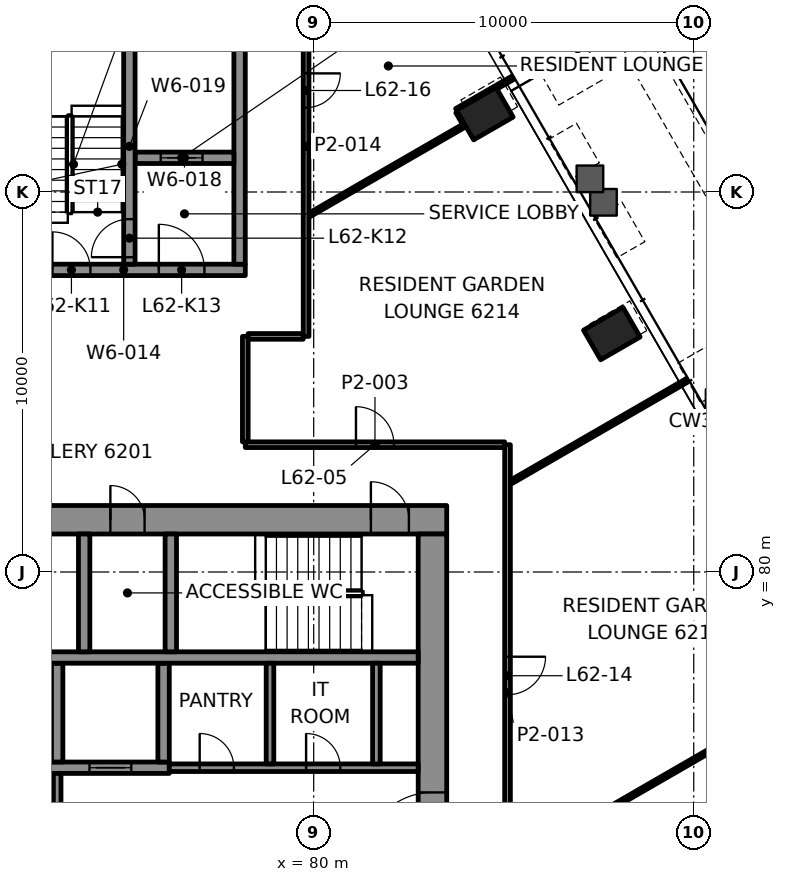
"""IFC4 building model, lengths in metres.
Left out: names, types, materials, properties, quantities, classifications, styles, units other than length and angle.
Written with IfcOpenShell. Run it as: python <this file> out.ifc"""

import sys

from ifc_helpers import new_model, si_unit, direction, frame, frame_2d, origin, origin_2d, place, context, subcontext, project, spatial, rectangle, hollow_rectangle, extrude, element, fill, save


model = new_model("IFC4")
c1 = context("Model", 3, precision=1e-05, world=origin(), true_north=direction((0.0, 1.0)))
c2 = subcontext(c1, "Body", "Model", "MODEL_VIEW")
j1 = project(units=[si_unit("LENGTHUNIT", "METRE"), si_unit("PLANEANGLEUNIT", "RADIAN")], contexts=[c1])
p1 = place(None, origin())
s1 = spatial("IfcSite", under=j1, at=p1, CompositionType="ELEMENT")
p2 = place(p1, origin())
s2 = spatial("IfcBuilding", under=s1, at=p2, CompositionType="ELEMENT")
p3 = place(p2, frame((0.0, 0.0, 263.6)))
s3 = spatial("IfcBuildingStorey", under=s2, at=p3, CompositionType="ELEMENT", Elevation=263.6)
for number, where, z_axis, x_axis in (
    (1, (87.844, 86.274, -0.0), (0.0, 0.0, 1.0), (-0.5, 0.866, 0.0)),
    (2, (84.503, 92.062, -0.0), (0.0, 0.0, 1.0), (-0.5, 0.866, 0.0)),
):
    element("IfcColumn", number, at=place(p3, frame(where, z_axis=z_axis, x_axis=x_axis)), inside=s3, PredefinedType="COLUMN", context=c2, shape_type="SweptSolid", body=[
        extrude(hollow_rectangle(XDim=0.9, YDim=1.2, WallThickness=0.06, at=origin_2d()), origin(), (0.0, 0.0, 1.0), 3.5),
    ])
p4 = place(p3, frame((66.5, 81.375, 0.0), z_axis=(0.0, 0.0, 1.0), x_axis=(1.0, 0.0, 0.0)))
e3 = element("IfcWall", 3, at=p4, inside=s3, PredefinedType="SHEAR", context=c2, shape_type="SweptSolid", body=[
    extrude(rectangle(XDim=17.0, YDim=0.75, at=frame_2d((8.5, 0.0))), origin(), (0.0, 0.0, 1.0), 3.3),
])
p5 = place(p4, frame((1.195, 0.0, 0.0)))
e4 = element("IfcOpeningElement", 4, at=p5, cuts=e3, PredefinedType="OPENING", context=c2, shape_type="SweptSolid", body=[
    extrude(rectangle(XDim=1.0, YDim=2.1, at=frame_2d((0.5, 1.05))), frame((0.0, 0.385, 0.0), z_axis=(0.0, -1.0, 0.0), x_axis=(1.0, 0.0, 0.0)), (0.0, 0.0, 1.0), 0.77),
])
p6 = place(p4, frame((15.005, 0.0, 0.0)))
e5 = element("IfcOpeningElement", 5, at=p6, cuts=e3, PredefinedType="OPENING", context=c2, shape_type="SweptSolid", body=[
    extrude(rectangle(XDim=1.0, YDim=2.1, at=frame_2d((0.5, 1.05))), frame((0.0, 0.385, 0.0), z_axis=(0.0, -1.0, 0.0), x_axis=(1.0, 0.0, 0.0)), (0.0, 0.0, 1.0), 0.77),
])
p7 = place(p4, frame((8.15, 0.0, 0.0)))
e6 = element("IfcOpeningElement", 6, at=p7, cuts=e3, PredefinedType="OPENING", context=c2, shape_type="SweptSolid", body=[
    extrude(rectangle(XDim=0.9, YDim=2.1, at=frame_2d((0.45, 1.05))), frame((0.0, 0.385, 0.0), z_axis=(0.0, -1.0, 0.0), x_axis=(1.0, 0.0, 0.0)), (0.0, 0.0, 1.0), 0.77),
])
p8 = place(p3, frame((83.125, 69.0, 0.0), z_axis=(0.0, 0.0, 1.0), x_axis=(0.0, 1.0, 0.0)))
e7 = element("IfcWall", 7, at=p8, inside=s3, PredefinedType="SHEAR", context=c2, shape_type="SweptSolid", body=[
    extrude(rectangle(XDim=12.0, YDim=0.75, at=frame_2d((6.0, 0.0))), origin(), (0.0, 0.0, 1.0), 3.3),
])
p9 = place(p8, frame((3.4, 0.0, 0.0)))
e8 = element("IfcOpeningElement", 8, at=p9, cuts=e7, PredefinedType="OPENING", context=c2, shape_type="SweptSolid", body=[
    extrude(rectangle(XDim=1.8, YDim=2.1, at=frame_2d((0.9, 1.05))), frame((0.0, 0.385, 0.0), z_axis=(0.0, -1.0, 0.0), x_axis=(1.0, 0.0, 0.0)), (0.0, 0.0, 1.0), 0.77),
])
p10 = place(p3, frame((70.3, 74.85, 0.0), z_axis=(0.0, 0.0, 1.0), x_axis=(1.0, 0.0, 0.0)))
e9 = element("IfcWall", 9, at=p10, inside=s3, PredefinedType="SHEAR", context=c2, shape_type="SweptSolid", body=[
    extrude(rectangle(XDim=5.9, YDim=0.3, at=frame_2d((2.95, 0.0))), origin(), (0.0, 0.0, 1.0), 3.3),
])
p11 = place(p10, frame((3.8, 0.0, 0.0)))
e10 = element("IfcOpeningElement", 10, at=p11, cuts=e9, PredefinedType="OPENING", context=c2, shape_type="SweptSolid", body=[
    extrude(rectangle(XDim=1.1, YDim=2.1, at=frame_2d((0.55, 1.05))), frame((0.0, 0.16, 0.0), z_axis=(0.0, -1.0, 0.0), x_axis=(1.0, 0.0, 0.0)), (0.0, 0.0, 1.0), 0.32),
])
for number, where, z_axis, x_axis in (
    (11, (73.25, 75.0, 0.0), (0.0, 0.0, 1.0), (0.0, 1.0, 0.0)),
    (12, (76.05, 75.0, 0.0), (0.0, 0.0, 1.0), (0.0, 1.0, 0.0)),
):
    element("IfcWall", number, at=place(p3, frame(where, z_axis=z_axis, x_axis=x_axis)), inside=s3, PredefinedType="SHEAR", context=c2, shape_type="SweptSolid", body=[
        extrude(rectangle(XDim=2.6, YDim=0.3, at=frame_2d((1.3, 0.0))), origin(), (0.0, 0.0, 1.0), 3.3),
    ])
p12 = place(p3, frame((67.25, 77.75, 0.0), z_axis=(0.0, 0.0, 1.0), x_axis=(1.0, 0.0, 0.0)))
e13 = element("IfcWall", 13, at=p12, inside=s3, PredefinedType="SHEAR", context=c2, shape_type="SweptSolid", body=[
    extrude(rectangle(XDim=15.5, YDim=0.3, at=frame_2d((7.75, 0.0))), origin(), (0.0, 0.0, 1.0), 3.3),
])
p13 = place(p12, frame((0.445, 0.0, 0.0)))
e14 = element("IfcOpeningElement", 14, at=p13, cuts=e13, PredefinedType="OPENING", context=c2, shape_type="SweptSolid", body=[
    extrude(rectangle(XDim=1.0, YDim=2.1, at=frame_2d((0.5, 1.05))), frame((0.0, 0.16, 0.0), z_axis=(0.0, -1.0, 0.0), x_axis=(1.0, 0.0, 0.0)), (0.0, 0.0, 1.0), 0.32),
])
for number, where, z_axis, x_axis in (
    (15, (73.96, 77.9, 0.0), (0.0, 0.0, 1.0), (0.0, 1.0, 0.0)),
    (16, (76.24, 77.9, 0.0), (0.0, 0.0, 1.0), (0.0, 1.0, 0.0)),
):
    element("IfcWall", number, at=place(p3, frame(where, z_axis=z_axis, x_axis=x_axis)), inside=s3, PredefinedType="SHEAR", context=c2, shape_type="SweptSolid", body=[
        extrude(rectangle(XDim=3.1, YDim=0.3, at=frame_2d((1.55, 0.0))), origin(), (0.0, 0.0, 1.0), 3.3),
    ])
p14 = place(p3, frame((71.8, 87.95, 0.0), z_axis=(0.0, 0.0, 1.0), x_axis=(1.0, 0.0, 0.0)))
e17 = element("IfcWall", 17, at=p14, inside=s3, PredefinedType="SHEAR", context=c2, shape_type="SweptSolid", body=[
    extrude(rectangle(XDim=6.4, YDim=0.3, at=frame_2d((3.2, 0.0))), origin(), (0.0, 0.0, 1.0), 3.3),
])
p15 = place(p14, frame((1.325, 0.0, 0.0)))
e18 = element("IfcOpeningElement", 18, at=p15, cuts=e17, PredefinedType="OPENING", context=c2, shape_type="SweptSolid", body=[
    extrude(rectangle(XDim=1.0, YDim=2.1, at=frame_2d((0.5, 1.05))), frame((0.0, 0.16, 0.0), z_axis=(0.0, -1.0, 0.0), x_axis=(1.0, 0.0, 0.0)), (0.0, 0.0, 1.0), 0.32),
])
p16 = place(p14, frame((4.125, 0.0, 0.0)))
e19 = element("IfcOpeningElement", 19, at=p16, cuts=e17, PredefinedType="OPENING", context=c2, shape_type="SweptSolid", body=[
    extrude(rectangle(XDim=1.2, YDim=2.1, at=frame_2d((0.6, 1.05))), frame((0.0, 0.16, 0.0), z_axis=(0.0, -1.0, 0.0), x_axis=(1.0, 0.0, 0.0)), (0.0, 0.0, 1.0), 0.32),
])
p17 = place(p3, frame((78.05, 88.1, 0.0), z_axis=(0.0, 0.0, 1.0), x_axis=(0.0, 1.0, 0.0)))
e20 = element("IfcWall", 20, at=p17, inside=s3, PredefinedType="SHEAR", context=c2, shape_type="SweptSolid", body=[
    extrude(rectangle(XDim=6.2, YDim=0.3, at=frame_2d((3.1, 0.0))), origin(), (0.0, 0.0, 1.0), 3.3),
])
p18 = place(p3, frame((75.3, 90.9, 0.0), z_axis=(0.0, 0.0, 1.0), x_axis=(1.0, 0.0, 0.0)))
e21 = element("IfcWall", 21, at=p18, inside=s3, PredefinedType="SHEAR", context=c2, shape_type="SweptSolid", body=[
    extrude(rectangle(XDim=2.6, YDim=0.3, at=frame_2d((1.3, 0.0))), origin(), (0.0, 0.0, 1.0), 3.3),
])
p19 = place(p18, frame((0.675, 0.0, 0.0)))
e22 = element("IfcOpeningElement", 22, at=p19, cuts=e21, PredefinedType="OPENING", context=c2, shape_type="SweptSolid", body=[
    extrude(rectangle(XDim=1.1, YDim=2.1, at=frame_2d((0.55, 1.05))), frame((0.0, 0.16, 0.0), z_axis=(0.0, -1.0, 0.0), x_axis=(1.0, 0.0, 0.0)), (0.0, 0.0, 1.0), 0.32),
])
p20 = place(p3, frame((75.15, 88.1, 0.0), z_axis=(0.0, 0.0, 1.0), x_axis=(0.0, 1.0, 0.0)))
e23 = element("IfcWall", 23, at=p20, inside=s3, PredefinedType="SHEAR", context=c2, shape_type="SweptSolid", body=[
    extrude(rectangle(XDim=6.2, YDim=0.3, at=frame_2d((3.1, 0.0))), origin(), (0.0, 0.0, 1.0), 3.3),
])
p21 = place(p20, frame((0.185, 0.0, 0.0)))
e24 = element("IfcOpeningElement", 24, at=p21, cuts=e23, PredefinedType="OPENING", context=c2, shape_type="SweptSolid", body=[
    extrude(rectangle(XDim=1.0, YDim=2.1, at=frame_2d((0.5, 1.05))), frame((0.0, 0.16, 0.0), z_axis=(0.0, -1.0, 0.0), x_axis=(1.0, 0.0, 0.0)), (0.0, 0.0, 1.0), 0.32),
])
p22 = place(p3, frame((78.2, 83.35, 0.0), z_axis=(0.0, 0.0, 1.0), x_axis=(1.0, 0.0, 0.0)))
e25 = element("IfcWall", 25, at=p22, inside=s3, PredefinedType="PARTITIONING", context=c2, shape_type="SweptSolid", body=[
    extrude(rectangle(XDim=6.824, YDim=0.15, at=frame_2d((3.412, 0.0))), origin(), (0.0, 0.0, 1.0), 2.7),
])
p23 = place(p22, frame((2.912, 0.0, 0.0)))
e26 = element("IfcOpeningElement", 26, at=p23, cuts=e25, PredefinedType="OPENING", context=c2, shape_type="SweptSolid", body=[
    extrude(rectangle(XDim=1.0, YDim=2.1, at=frame_2d((0.5, 1.05))), frame((0.0, 0.085, 0.0), z_axis=(0.0, -1.0, 0.0), x_axis=(1.0, 0.0, 0.0)), (0.0, 0.0, 1.0), 0.17),
])
p24 = place(p3, frame((78.275, 86.2, 0.0), z_axis=(0.0, 0.0, 1.0), x_axis=(1.0, 0.0, 0.0)))
e27 = element("IfcWall", 27, at=p24, inside=s3, PredefinedType="PARTITIONING", context=c2, shape_type="SweptSolid", body=[
    extrude(rectangle(XDim=1.45, YDim=0.15, at=frame_2d((0.725, 0.0))), origin(), (0.0, 0.0, 1.0), 2.7),
])
p25 = place(p3, frame((85.201, 72.284, 0.0), z_axis=(0.0, 0.0, 1.0), x_axis=(0.866018018137, 0.500012792098, 0.0)))
e28 = element("IfcWall", 28, at=p25, inside=s3, PredefinedType="PARTITIONING", context=c2, shape_type="SweptSolid", body=[
    extrude(rectangle(XDim=10.385, YDim=0.1, at=frame_2d((5.192, 0.0))), origin(), (0.0, 0.0, 1.0), 2.688),
])
p26 = place(p3, frame((85.201, 82.375, 0.0), z_axis=(0.0, 0.0, 1.0), x_axis=(0.866025682925, 0.499999516514, 0.0)))
e29 = element("IfcWall", 29, at=p26, inside=s3, PredefinedType="PARTITIONING", context=c2, shape_type="SweptSolid", body=[
    extrude(rectangle(XDim=5.339, YDim=0.1, at=frame_2d((2.67, 0.0))), origin(), (0.0, 0.0, 1.0), 2.688),
])
p27 = place(p3, frame((79.901, 89.404, 0.0), z_axis=(0.0, 0.0, 1.0), x_axis=(0.866026044032, 0.499998891056, 0.0)))
e30 = element("IfcWall", 30, at=p27, inside=s3, PredefinedType="PARTITIONING", context=c2, shape_type="SweptSolid", body=[
    extrude(rectangle(XDim=4.714, YDim=0.1, at=frame_2d((2.357, 0.0))), origin(), (0.0, 0.0, 1.0), 2.7),
])
p28 = place(p3, frame((83.759, 92.151, 0.0), z_axis=(0.0, 0.0, 1.0), x_axis=(0.865979829179, 0.500078929226, 0.0)))
e31 = element("IfcWall", 31, at=p28, inside=s3, PredefinedType="PARTITIONING", context=c2, shape_type="SweptSolid", body=[
    extrude(rectangle(XDim=1.699, YDim=0.1, at=frame_2d((0.85, 0.0))), origin(), (0.0, 0.0, 1.0), 2.7),
])
p29 = place(p3, frame((85.1, 83.35, 0.0), z_axis=(0.0, 0.0, 1.0), x_axis=(0.0, -1.0, 0.0)))
e32 = element("IfcWall", 32, at=p29, inside=s3, PredefinedType="PARTITIONING", context=c2, shape_type="SweptSolid", body=[
    extrude(rectangle(XDim=13.055, YDim=0.15, at=frame_2d((6.527, 0.0))), origin(), (0.0, 0.0, 1.0), 2.7),
])
p30 = place(p29, frame((5.579, 0.0, 0.0)))
e33 = element("IfcOpeningElement", 33, at=p30, cuts=e32, PredefinedType="OPENING", context=c2, shape_type="SweptSolid", body=[
    extrude(rectangle(XDim=1.0, YDim=2.1, at=frame_2d((0.5, 1.05))), frame((0.0, 0.085, 0.0), z_axis=(0.0, -1.0, 0.0), x_axis=(1.0, 0.0, 0.0)), (0.0, 0.0, 1.0), 0.17),
])
p31 = place(p29, frame((11.488, 0.0, 0.0)))
e34 = element("IfcOpeningElement", 34, at=p31, cuts=e32, PredefinedType="OPENING", context=c2, shape_type="SweptSolid", body=[
    extrude(rectangle(XDim=1.0, YDim=2.1, at=frame_2d((0.5, 1.05))), frame((0.0, 0.085, 0.0), z_axis=(0.0, -1.0, 0.0), x_axis=(1.0, 0.0, 0.0)), (0.0, 0.0, 1.0), 0.17),
])
p32 = place(p3, frame((79.8, 96.199, 0.0), z_axis=(0.0, 0.0, 1.0), x_axis=(0.0, -1.0, 0.0)))
e35 = element("IfcWall", 35, at=p32, inside=s3, PredefinedType="PARTITIONING", context=c2, shape_type="SweptSolid", body=[
    extrude(rectangle(XDim=9.999, YDim=0.15, at=frame_2d((5.0, 0.0))), origin(), (0.0, 0.0, 1.0), 2.7),
])
p33 = place(p32, frame((3.078, 0.0, 0.0)))
e36 = element("IfcOpeningElement", 36, at=p33, cuts=e35, PredefinedType="OPENING", context=c2, shape_type="SweptSolid", body=[
    extrude(rectangle(XDim=0.9, YDim=2.1, at=frame_2d((0.45, 1.05))), frame((0.0, 0.085, 0.0), z_axis=(0.0, -1.0, 0.0), x_axis=(1.0, 0.0, 0.0)), (0.0, 0.0, 1.0), 0.17),
])
p34 = place(p3, frame((78.2, 83.425, 0.0), z_axis=(0.0, 0.0, 1.0), x_axis=(0.0, 1.0, 0.0)))
e37 = element("IfcWall", 37, at=p34, inside=s3, PredefinedType="PARTITIONING", context=c2, shape_type="SweptSolid", body=[
    extrude(rectangle(XDim=2.775, YDim=0.15, at=frame_2d((1.387, 0.0))), origin(), (0.0, 0.0, 1.0), 2.697),
])
p35 = place(p3, frame((83.954, 91.813, 0.0), z_axis=(0.0, 0.0, 1.0), x_axis=(-0.499618727529, 0.866245419672, 0.0)))
e38 = element("IfcWall", 38, at=p35, inside=s3, PredefinedType="PARTITIONING", context=c2, shape_type="SweptSolid", body=[
    extrude(rectangle(XDim=0.34, YDim=0.1, at=frame_2d((0.17, 0.0))), origin(), (0.0, 0.0, 1.0), 2.7),
])
p36 = place(p3, frame((105.682, 64.079, 0.0), z_axis=(0.0, 0.0, 1.0), x_axis=(-0.499999726341, 0.866025561782, 0.0)))
e39 = element("IfcWall", 39, at=p36, inside=s3, PredefinedType="SOLIDWALL", context=c2, shape_type="SweptSolid", body=[
    extrude(rectangle(XDim=34.095, YDim=0.8, at=frame_2d((17.048, 0.0))), origin(), (0.0, 0.0, 1.0), 0.9),
])
p37 = place(p3, frame((88.156, 93.734, 0.0), z_axis=(0.0, 0.0, 1.0), x_axis=(-0.866028486751, -0.499994660107, 0.0)))
e40 = element("IfcWall", 40, at=p37, inside=s3, PredefinedType="SOLIDWALL", context=c2, shape_type="SweptSolid", body=[
    extrude(rectangle(XDim=2.2, YDim=0.8, at=frame_2d((1.1, 0.0))), origin(), (0.0, 0.0, 1.0), 0.9),
])
p38 = place(p3, frame((76.2, 74.85, 0.0), z_axis=(0.0, 0.0, 1.0), x_axis=(1.0, 0.0, 0.0)))
e41 = element("IfcWall", 41, at=p38, inside=s3, PredefinedType="PARTITIONING", context=c2, shape_type="SweptSolid", body=[
    extrude(rectangle(XDim=6.55, YDim=0.2, at=frame_2d((3.275, 0.0))), origin(), (0.0, 0.0, 1.0), 3.3),
])
p39 = place(p38, frame((0.8, 0.0, 0.0)))
e42 = element("IfcOpeningElement", 42, at=p39, cuts=e41, PredefinedType="OPENING", context=c2, shape_type="SweptSolid", body=[
    extrude(rectangle(XDim=0.9, YDim=2.1, at=frame_2d((0.45, 1.05))), frame((0.0, 0.11, 0.0), z_axis=(0.0, -1.0, 0.0), x_axis=(1.0, 0.0, 0.0)), (0.0, 0.0, 1.0), 0.22),
])
p40 = place(p38, frame((3.6, 0.0, 0.0)))
e43 = element("IfcOpeningElement", 43, at=p40, cuts=e41, PredefinedType="OPENING", context=c2, shape_type="SweptSolid", body=[
    extrude(rectangle(XDim=0.9, YDim=2.1, at=frame_2d((0.45, 1.05))), frame((0.0, 0.11, 0.0), z_axis=(0.0, -1.0, 0.0), x_axis=(1.0, 0.0, 0.0)), (0.0, 0.0, 1.0), 0.22),
])
p41 = place(p3, frame((73.25, 71.9, 0.0), z_axis=(0.0, 0.0, 1.0), x_axis=(0.0, 1.0, 0.0)))
e44 = element("IfcWall", 44, at=p41, inside=s3, PredefinedType="PARTITIONING", context=c2, shape_type="SweptSolid", body=[
    extrude(rectangle(XDim=2.8, YDim=0.2, at=frame_2d((1.4, 0.0))), origin(), (0.0, 0.0, 1.0), 3.3),
])
p42 = place(p41, frame((0.8, 0.0, 0.0)))
e45 = element("IfcOpeningElement", 45, at=p42, cuts=e44, PredefinedType="OPENING", context=c2, shape_type="SweptSolid", body=[
    extrude(rectangle(XDim=1.2, YDim=2.1, at=frame_2d((0.6, 1.05))), frame((0.0, 0.11, 0.0), z_axis=(0.0, -1.0, 0.0), x_axis=(1.0, 0.0, 0.0)), (0.0, 0.0, 1.0), 0.22),
])
for number, where, z_axis, x_axis in (
    (46, (78.85, 74.95, 0.0), (0.0, 0.0, 1.0), (0.0, 1.0, 0.0)),
    (47, (81.65, 74.95, 0.0), (0.0, 0.0, 1.0), (0.0, 1.0, 0.0)),
):
    element("IfcWall", number, at=place(p3, frame(where, z_axis=z_axis, x_axis=x_axis)), inside=s3, PredefinedType="PARTITIONING", context=c2, shape_type="SweptSolid", body=[
        extrude(rectangle(XDim=2.65, YDim=0.2, at=frame_2d((1.325, 0.0))), origin(), (0.0, 0.0, 1.0), 3.3),
    ])
p43 = place(p23, origin())
e48 = element("IfcDoor", 48, at=p43, inside=s3, OperationType="SINGLE_SWING_LEFT", PredefinedType="DOOR", context=c2, shape_type="SweptSolid", body=[
    extrude(rectangle(XDim=1.0, YDim=2.1, at=frame_2d((0.5, 1.05))), frame((0.0, 0.025, 0.0), z_axis=(0.0, -1.0, 0.0), x_axis=(1.0, 0.0, 0.0)), (0.0, 0.0, 1.0), 0.05),
])
fill(e26, e48)
p44 = place(p30, origin())
e49 = element("IfcDoor", 49, at=p44, inside=s3, OperationType="SINGLE_SWING_LEFT", PredefinedType="DOOR", context=c2, shape_type="SweptSolid", body=[
    extrude(rectangle(XDim=1.0, YDim=2.1, at=frame_2d((0.5, 1.05))), frame((0.0, 0.025, 0.0), z_axis=(0.0, -1.0, 0.0), x_axis=(1.0, 0.0, 0.0)), (0.0, 0.0, 1.0), 0.05),
])
fill(e33, e49)
p45 = place(p33, origin())
e50 = element("IfcDoor", 50, at=p45, inside=s3, OperationType="SINGLE_SWING_LEFT", PredefinedType="DOOR", context=c2, shape_type="SweptSolid", body=[
    extrude(rectangle(XDim=0.9, YDim=2.1, at=frame_2d((0.45, 1.05))), frame((0.0, 0.025, 0.0), z_axis=(0.0, -1.0, 0.0), x_axis=(1.0, 0.0, 0.0)), (0.0, 0.0, 1.0), 0.05),
])
fill(e36, e50)
p46 = place(p11, origin())
e51 = element("IfcDoor", 51, at=p46, inside=s3, OperationType="DOUBLE_DOOR_SLIDING", PredefinedType="DOOR", context=c2, shape_type="SweptSolid", body=[
    extrude(rectangle(XDim=1.1, YDim=2.1, at=frame_2d((0.55, 1.05))), frame((0.0, 0.025, 0.0), z_axis=(0.0, -1.0, 0.0), x_axis=(1.0, 0.0, 0.0)), (0.0, 0.0, 1.0), 0.05),
])
fill(e10, e51)
p47 = place(p19, origin())
e52 = element("IfcDoor", 52, at=p47, inside=s3, OperationType="DOUBLE_DOOR_SLIDING", PredefinedType="DOOR", context=c2, shape_type="SweptSolid", body=[
    extrude(rectangle(XDim=1.1, YDim=2.1, at=frame_2d((0.55, 1.05))), frame((0.0, 0.025, 0.0), z_axis=(0.0, -1.0, 0.0), x_axis=(1.0, 0.0, 0.0)), (0.0, 0.0, 1.0), 0.05),
])
fill(e22, e52)
p48 = place(p6, origin())
e53 = element("IfcDoor", 53, at=p48, inside=s3, OperationType="SINGLE_SWING_LEFT", PredefinedType="DOOR", context=c2, shape_type="SweptSolid", body=[
    extrude(rectangle(XDim=1.0, YDim=2.1, at=frame_2d((0.5, 1.05))), frame((0.0, 0.095, 0.0), z_axis=(0.0, -1.0, 0.0), x_axis=(1.0, 0.0, 0.0)), (0.0, 0.0, 1.0), 0.19),
])
fill(e5, e53)
p49 = place(p15, origin())
e54 = element("IfcDoor", 54, at=p49, inside=s3, OperationType="SINGLE_SWING_RIGHT", PredefinedType="DOOR", context=c2, shape_type="SweptSolid", body=[
    extrude(rectangle(XDim=1.0, YDim=2.1, at=frame_2d((0.5, 1.05))), frame((0.0, 0.025, 0.0), z_axis=(0.0, -1.0, 0.0), x_axis=(1.0, 0.0, 0.0)), (0.0, 0.0, 1.0), 0.05),
])
fill(e18, e54)
p50 = place(p21, origin())
e55 = element("IfcDoor", 55, at=p50, inside=s3, OperationType="SINGLE_SWING_LEFT", PredefinedType="DOOR", context=c2, shape_type="SweptSolid", body=[
    extrude(rectangle(XDim=1.0, YDim=2.1, at=frame_2d((0.5, 1.05))), frame((0.0, 0.025, 0.0), z_axis=(0.0, -1.0, 0.0), x_axis=(1.0, 0.0, 0.0)), (0.0, 0.0, 1.0), 0.05),
])
fill(e24, e55)
p51 = place(p16, origin())
e56 = element("IfcDoor", 56, at=p51, inside=s3, OperationType="SINGLE_SWING_RIGHT", PredefinedType="DOOR", context=c2, shape_type="SweptSolid", body=[
    extrude(rectangle(XDim=1.2, YDim=2.1, at=frame_2d((0.6, 1.05))), frame((0.0, 0.025, 0.0), z_axis=(0.0, -1.0, 0.0), x_axis=(1.0, 0.0, 0.0)), (0.0, 0.0, 1.0), 0.05),
])
fill(e19, e56)
p52 = place(p9, origin())
e57 = element("IfcDoor", 57, at=p52, inside=s3, OperationType="SINGLE_SWING_LEFT", PredefinedType="DOOR", context=c2, shape_type="SweptSolid", body=[
    extrude(rectangle(XDim=1.8, YDim=2.1, at=frame_2d((0.9, 1.05))), frame((0.0, 0.095, 0.0), z_axis=(0.0, -1.0, 0.0), x_axis=(1.0, 0.0, 0.0)), (0.0, 0.0, 1.0), 0.19),
])
fill(e8, e57)
p53 = place(p39, origin())
e58 = element("IfcDoor", 58, at=p53, inside=s3, OperationType="SINGLE_SWING_RIGHT", PredefinedType="DOOR", context=c2, shape_type="SweptSolid", body=[
    extrude(rectangle(XDim=0.9, YDim=2.1, at=frame_2d((0.45, 1.05))), frame((0.0, 0.025, 0.0), z_axis=(0.0, -1.0, 0.0), x_axis=(1.0, 0.0, 0.0)), (0.0, 0.0, 1.0), 0.05),
])
fill(e42, e58)
p54 = place(p40, origin())
e59 = element("IfcDoor", 59, at=p54, inside=s3, OperationType="SINGLE_SWING_LEFT", PredefinedType="DOOR", context=c2, shape_type="SweptSolid", body=[
    extrude(rectangle(XDim=0.9, YDim=2.1, at=frame_2d((0.45, 1.05))), frame((0.0, 0.025, 0.0), z_axis=(0.0, -1.0, 0.0), x_axis=(1.0, 0.0, 0.0)), (0.0, 0.0, 1.0), 0.05),
])
fill(e43, e59)
p55 = place(p7, origin())
e60 = element("IfcDoor", 60, at=p55, inside=s3, OperationType="SINGLE_SWING_RIGHT", PredefinedType="DOOR", context=c2, shape_type="SweptSolid", body=[
    extrude(rectangle(XDim=0.9, YDim=2.1, at=frame_2d((0.45, 1.05))), frame((0.0, 0.095, 0.0), z_axis=(0.0, -1.0, 0.0), x_axis=(1.0, 0.0, 0.0)), (0.0, 0.0, 1.0), 0.19),
])
fill(e6, e60)
save(model, sys.argv[1])
